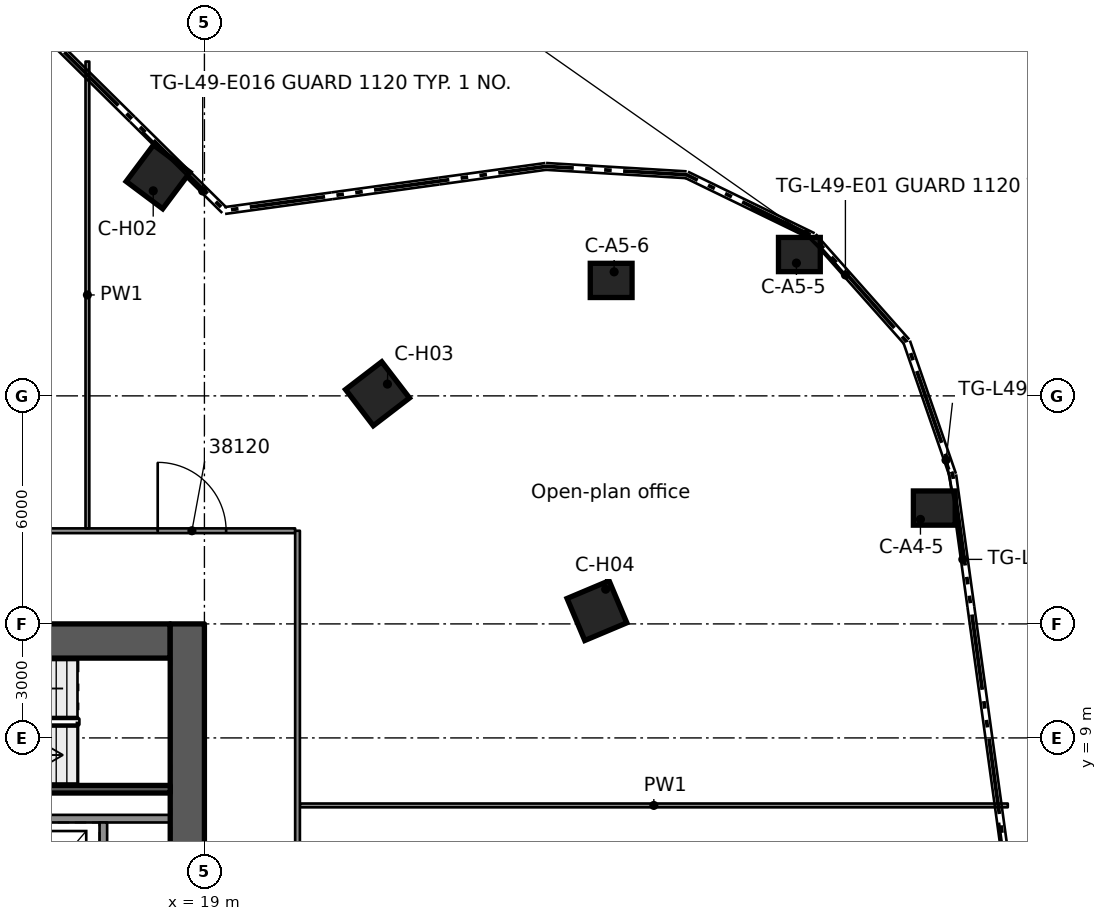
"""IFC4 building model, lengths in metres.
Left out: names, types, materials, properties, quantities, classifications, styles, units other than length and angle.
Written with IfcOpenShell. Run it as: python <this file> out.ifc"""

import sys

from ifc_helpers import new_model, si_unit, direction, frame, frame_2d, origin, origin_2d, place, context, subcontext, project, spatial, rectangle, extrude, element, fill, save


model = new_model("IFC4")
c1 = context("Model", 3, precision=1e-05, world=origin(), true_north=direction((0.0, 1.0)))
c2 = subcontext(c1, "Body", "Model", "MODEL_VIEW")
j1 = project(units=[si_unit("LENGTHUNIT", "METRE"), si_unit("PLANEANGLEUNIT", "RADIAN")], contexts=[c1])
p1 = place(None, origin())
s1 = spatial("IfcSite", under=j1, at=p1, CompositionType="ELEMENT")
p2 = place(p1, origin())
s2 = spatial("IfcBuilding", under=s1, at=p2, CompositionType="ELEMENT")
p3 = place(p2, frame((0.0, 0.0, 188.6)))
s3 = spatial("IfcBuildingStorey", under=s2, at=p3, CompositionType="ELEMENT", Elevation=188.6)
p4 = place(p3, frame((8.9, 11.55, 0.0), z_axis=(0.0, 0.0, 1.0), x_axis=(1.0, 0.0, 0.0)))
e1 = element("IfcWall", 1, at=p4, inside=s3, PredefinedType="SHEAR", context=c2, shape_type="SweptSolid", body=[
    extrude(rectangle(XDim=9.2, YDim=0.9, at=frame_2d((4.6, 0.0))), origin(), (0.0, 0.0, 1.0), 3.5),
])
p5 = place(p4, frame((3.0, 0.0, 0.0)))
e2 = element("IfcOpeningElement", 2, at=p5, cuts=e1, PredefinedType="OPENING", context=c2, shape_type="SweptSolid", body=[
    extrude(rectangle(XDim=1.1, YDim=2.1, at=frame_2d((0.55, 1.05))), frame((0.0, 0.46, 0.0), z_axis=(0.0, -1.0, 0.0), x_axis=(1.0, 0.0, 0.0)), (0.0, 0.0, 1.0), 0.92),
])
p6 = place(p4, frame((0.77, 0.0, 0.0)))
e3 = element("IfcOpeningElement", 3, at=p6, cuts=e1, PredefinedType="OPENING", context=c2, shape_type="SweptSolid", body=[
    extrude(rectangle(XDim=0.9, YDim=2.1, at=frame_2d((0.45, 1.05))), frame((0.0, 0.46, 0.0), z_axis=(0.0, -1.0, 0.0), x_axis=(1.0, 0.0, 0.0)), (0.0, 0.0, 1.0), 0.92),
])
p7 = place(p3, frame((18.55, -12.0, 0.0), z_axis=(0.0, 0.0, 1.0), x_axis=(0.0, 1.0, 0.0)))
e4 = element("IfcWall", 4, at=p7, inside=s3, PredefinedType="SHEAR", context=c2, shape_type="SweptSolid", body=[
    extrude(rectangle(XDim=24.0, YDim=0.9, at=frame_2d((12.0, 0.0))), origin(), (0.0, 0.0, 1.0), 3.5),
])
p8 = place(p7, frame((12.1, 0.0, 0.0)))
e5 = element("IfcOpeningElement", 5, at=p8, cuts=e4, PredefinedType="OPENING", context=c2, shape_type="SweptSolid", body=[
    extrude(rectangle(XDim=1.8, YDim=2.1, at=frame_2d((0.9, 1.05))), frame((0.0, 0.46, 0.0), z_axis=(0.0, -1.0, 0.0), x_axis=(1.0, 0.0, 0.0)), (0.0, 0.0, 1.0), 0.92),
])
for number, where, z_axis, x_axis in (
    (6, (38.206, 15.048, 0.0), (0.0, 0.0, 1.0), (1.0, 0.0, 0.0)),
    (7, (34.656, 21.719, 0.0), (0.0, 0.0, 1.0), (1.0, 0.0, 0.0)),
    (8, (29.703, 21.038, 0.0), (0.0, 0.0, 1.0), (1.0, 0.0, 0.0)),
):
    element("IfcColumn", number, at=place(p3, frame(where, z_axis=z_axis, x_axis=x_axis)), inside=s3, PredefinedType="COLUMN", context=c2, shape_type="SweptSolid", body=[
        extrude(rectangle(XDim=1.1, YDim=0.9, at=origin_2d()), origin(), (0.0, 0.0, 1.0), 3.5),
    ])
for number, where, z_axis, x_axis in (
    (9, (17.781, 23.763, 0.0), (0.0, 0.0, 1.0), (0.599, 0.801, 0.0)),
    (10, (23.555, 18.056, 0.0), (0.0, 0.0, 1.0), (0.794, 0.608, 0.0)),
    (11, (29.329, 12.349, 0.0), (0.0, 0.0, 1.0), (0.922, 0.388, 0.0)),
):
    element("IfcColumn", number, at=place(p3, frame(where, z_axis=z_axis, x_axis=x_axis)), inside=s3, PredefinedType="COLUMN", context=c2, shape_type="SweptSolid", body=[
        extrude(rectangle(XDim=1.2, YDim=1.2, at=origin_2d()), origin(), (0.0, 0.0, 1.0), 3.5),
    ])
p9 = place(p3, frame((11.54, 6.875, 0.0), z_axis=(0.0, 0.0, 1.0), x_axis=(1.0, 0.0, 0.0)))
e12 = element("IfcWall", 12, at=p9, inside=s3, PredefinedType="SOLIDWALL", context=c2, shape_type="SweptSolid", body=[
    extrude(rectangle(XDim=6.56, YDim=0.2, at=frame_2d((3.28, 0.0))), origin(), (0.0, 0.0, 1.0), 3.08),
])
p10 = place(p3, frame((16.34, 6.775, 0.0), z_axis=(0.0, 0.0, 1.0), x_axis=(0.0, -1.0, 0.0)))
e13 = element("IfcWall", 13, at=p10, inside=s3, PredefinedType="SOLIDWALL", context=c2, shape_type="SweptSolid", body=[
    extrude(rectangle(XDim=2.75, YDim=0.2, at=frame_2d((1.375, 0.0))), origin(), (0.0, 0.0, 1.0), 3.08),
])
p11 = place(p10, frame((0.725, 0.0, 0.0)))
e14 = element("IfcOpeningElement", 14, at=p11, cuts=e13, PredefinedType="OPENING", context=c2, shape_type="SweptSolid", body=[
    extrude(rectangle(XDim=1.1, YDim=2.1, at=frame_2d((0.55, 1.05))), frame((0.0, 0.11, 0.0), z_axis=(0.0, -1.0, 0.0), x_axis=(1.0, 0.0, 0.0)), (0.0, 0.0, 1.0), 0.22),
])
p12 = place(p3, frame((11.54, 7.65, 0.0), z_axis=(0.0, 0.0, 1.0), x_axis=(1.0, 0.0, 0.0)))
e15 = element("IfcWall", 15, at=p12, inside=s3, PredefinedType="SOLIDWALL", context=c2, shape_type="SweptSolid", body=[
    extrude(rectangle(XDim=6.56, YDim=0.2, at=frame_2d((3.28, 0.0))), origin(), (0.0, 0.0, 1.0), 3.08),
])
p13 = place(p3, frame((21.512, 7.224, 0.0), z_axis=(0.0, 0.0, 1.0), x_axis=(1.0, 0.0, 0.0)))
e16 = element("IfcWall", 16, at=p13, inside=s3, PredefinedType="PARTITIONING", context=c2, shape_type="SweptSolid", body=[
    extrude(rectangle(XDim=18.628, YDim=0.1, at=frame_2d((9.314, 0.0))), origin(), (0.0, 0.0, 1.0), 3.06),
])
p14 = place(p3, frame((10.391, 14.451, 0.0), z_axis=(0.0, 0.0, 1.0), x_axis=(1.0, 0.0, 0.0)))
e17 = element("IfcWall", 17, at=p14, inside=s3, PredefinedType="PARTITIONING", context=c2, shape_type="SweptSolid", body=[
    extrude(rectangle(XDim=10.996, YDim=0.125, at=frame_2d((5.498, 0.0))), origin(), (0.0, 0.0, 1.0), 3.06),
])
p15 = place(p14, frame((7.38, 0.0, 0.0)))
e18 = element("IfcOpeningElement", 18, at=p15, cuts=e17, PredefinedType="OPENING", context=c2, shape_type="SweptSolid", body=[
    extrude(rectangle(XDim=1.8, YDim=2.1, at=frame_2d((0.9, 1.05))), frame((0.0, 0.073, 0.0), z_axis=(0.0, -1.0, 0.0), x_axis=(1.0, 0.0, 0.0)), (0.0, 0.0, 1.0), 0.145),
])
p16 = place(p3, frame((21.45, 14.451, 0.0), z_axis=(0.0, 0.0, 1.0), x_axis=(0.0, -1.0, 0.0)))
e19 = element("IfcWall", 19, at=p16, inside=s3, PredefinedType="PARTITIONING", context=c2, shape_type="SweptSolid", body=[
    extrude(rectangle(XDim=28.902, YDim=0.125, at=frame_2d((14.451, 0.0))), origin(), (0.0, 0.0, 1.0), 3.06),
])
p17 = place(p16, frame((17.551, 0.0, 0.0)))
e20 = element("IfcOpeningElement", 20, at=p17, cuts=e19, PredefinedType="OPENING", context=c2, shape_type="SweptSolid", body=[
    extrude(rectangle(XDim=0.9, YDim=2.1, at=frame_2d((0.45, 1.05))), frame((0.0, 0.073, 0.0), z_axis=(0.0, -1.0, 0.0), x_axis=(1.0, 0.0, 0.0)), (0.0, 0.0, 1.0), 0.145),
])
p18 = place(p16, frame((9.827, 0.0, 0.0)))
e21 = element("IfcOpeningElement", 21, at=p18, cuts=e19, PredefinedType="OPENING", context=c2, shape_type="SweptSolid", body=[
    extrude(rectangle(XDim=1.8, YDim=2.1, at=frame_2d((0.9, 1.05))), frame((0.0, 0.073, 0.0), z_axis=(0.0, -1.0, 0.0), x_axis=(1.0, 0.0, 0.0)), (0.0, 0.0, 1.0), 0.145),
])
p19 = place(p3, frame((15.921, 14.514, 0.0), z_axis=(0.0, 0.0, 1.0), x_axis=(0.0, 1.0, 0.0)))
e22 = element("IfcWall", 22, at=p19, inside=s3, PredefinedType="PARTITIONING", context=c2, shape_type="SweptSolid", body=[
    extrude(rectangle(XDim=12.283, YDim=0.1, at=frame_2d((6.142, 0.0))), origin(), (0.0, 0.0, 1.0), 3.06),
])
p20 = place(p15, origin())
e23 = element("IfcDoor", 23, at=p20, inside=s3, OperationType="DOUBLE_DOOR_SINGLE_SWING", PredefinedType="DOOR", context=c2, shape_type="SweptSolid", body=[
    extrude(rectangle(XDim=1.8, YDim=2.1, at=frame_2d((0.9, 1.05))), frame((0.0, 0.025, 0.0), z_axis=(0.0, -1.0, 0.0), x_axis=(1.0, 0.0, 0.0)), (0.0, 0.0, 1.0), 0.05),
])
fill(e18, e23)
save(model, sys.argv[1])
